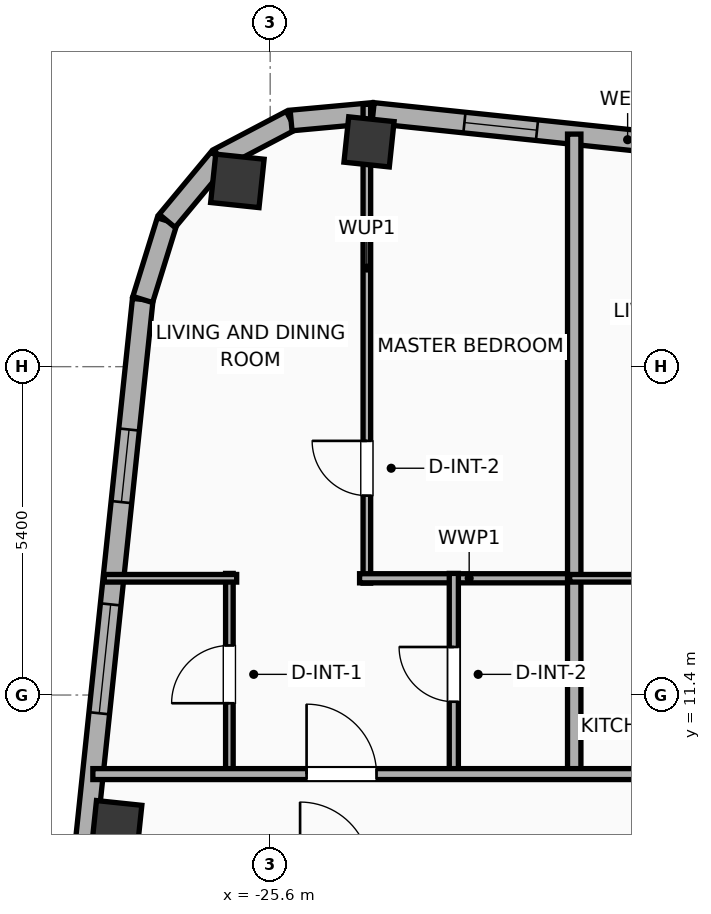
"""IFC4 building model, lengths in metres.
Left out: names, types, materials, properties, quantities, classifications, styles, units other than length and angle.
Written with IfcOpenShell. Run it as: python <this file> out.ifc"""

import sys

from ifc_helpers import new_model, si_unit, direction, frame, frame_2d, origin, origin_2d, place, context, subcontext, project, spatial, rectangle, hollow_rectangle, hollow_circle, extrude, element, fill, save


model = new_model("IFC4")
c1 = context("Model", 3, precision=1e-05, world=origin(), true_north=direction((0.0, 1.0)))
c2 = subcontext(c1, "Body", "Model", "MODEL_VIEW")
j1 = project(units=[si_unit("LENGTHUNIT", "METRE"), si_unit("PLANEANGLEUNIT", "RADIAN")], contexts=[c1])
p1 = place(None, origin())
s1 = spatial("IfcSite", under=j1, at=p1, CompositionType="ELEMENT")
p2 = place(p1, origin())
s2 = spatial("IfcBuilding", under=s1, at=p2, CompositionType="ELEMENT")
p3 = place(p2, frame((0.0, 0.0, 260.0)))
s3 = spatial("IfcBuildingStorey", under=s2, at=p3, CompositionType="ELEMENT", Elevation=260.0)
p4 = place(p3, frame((-23.975, 20.497, 0.0), z_axis=(0.0, 0.0, 1.0), x_axis=(0.994521895368, -0.104528463268, 0.0)))
e1 = element("IfcColumn", 1, at=p4, inside=s3, PredefinedType="COLUMN", context=c2, shape_type="SweptSolid", body=[
    extrude(hollow_rectangle(XDim=0.75, YDim=0.75, WallThickness=0.025, at=origin_2d()), origin(), (0.0, 0.0, 1.0), 3.9),
])
p5 = place(p3, frame((-26.139, 19.855, 0.0), z_axis=(0.0, 0.0, 1.0), x_axis=(0.994521895368, -0.104528463268, 0.0)))
e2 = element("IfcColumn", 2, at=p5, inside=s3, PredefinedType="COLUMN", context=c2, shape_type="SweptSolid", body=[
    extrude(hollow_circle(Radius=0.4, WallThickness=0.028, at=origin_2d()), origin(), (0.0, 0.0, 1.0), 3.9),
])
p6 = place(p3, frame((-28.123, 9.252, 0.0), z_axis=(0.0, 0.0, 1.0), x_axis=(0.994521895368, -0.104528463268, 0.0)))
e3 = element("IfcColumn", 3, at=p6, inside=s3, PredefinedType="COLUMN", context=c2, shape_type="SweptSolid", body=[
    extrude(hollow_rectangle(XDim=0.75, YDim=0.75, WallThickness=0.025, at=origin_2d()), origin(), (0.0, 0.0, 1.0), 3.9),
])
p7 = place(p3, frame((-30.87, -12.296, 0.0), z_axis=(0.0, 0.0, 1.0), x_axis=(0.104533282919, 0.994521388791, 0.0)))
e4 = element("IfcWall", 4, at=p7, inside=s3, PredefinedType="ELEMENTEDWALL", context=c2, shape_type="SweptSolid", body=[
    extrude(rectangle(XDim=30.366, YDim=0.34, at=frame_2d((15.183, 0.0))), origin(), (0.0, 0.0, 1.0), 2.54),
])
p8 = place(p7, frame((5.842, 0.0, 0.75)))
e5 = element("IfcOpeningElement", 5, at=p8, cuts=e4, PredefinedType="OPENING", context=c2, shape_type="SweptSolid", body=[
    extrude(rectangle(XDim=1.8, YDim=1.63, at=frame_2d((0.9, 0.815))), frame((0.0, 0.18, 0.0), z_axis=(0.0, -1.0, 0.0), x_axis=(1.0, 0.0, 0.0)), (0.0, 0.0, 1.0), 0.36),
])
p9 = place(p7, frame((23.525, 0.0, 0.75)))
e6 = element("IfcOpeningElement", 6, at=p9, cuts=e4, PredefinedType="OPENING", context=c2, shape_type="SweptSolid", body=[
    extrude(rectangle(XDim=1.8, YDim=1.63, at=frame_2d((0.9, 0.815))), frame((0.0, 0.18, 0.0), z_axis=(0.0, -1.0, 0.0), x_axis=(1.0, 0.0, 0.0)), (0.0, 0.0, 1.0), 0.36),
])
p10 = place(p7, frame((27.017, 0.0, 0.75)))
e7 = element("IfcOpeningElement", 7, at=p10, cuts=e4, PredefinedType="OPENING", context=c2, shape_type="SweptSolid", body=[
    extrude(rectangle(XDim=1.2, YDim=1.63, at=frame_2d((0.6, 0.815))), frame((0.0, 0.18, 0.0), z_axis=(0.0, -1.0, 0.0), x_axis=(1.0, 0.0, 0.0)), (0.0, 0.0, 1.0), 0.36),
])
p11 = place(p7, frame((16.135, 0.0, 0.75)))
e8 = element("IfcOpeningElement", 8, at=p11, cuts=e4, PredefinedType="OPENING", context=c2, shape_type="SweptSolid", body=[
    extrude(rectangle(XDim=1.2, YDim=1.63, at=frame_2d((0.6, 0.815))), frame((0.0, 0.18, 0.0), z_axis=(0.0, -1.0, 0.0), x_axis=(1.0, 0.0, 0.0)), (0.0, 0.0, 1.0), 0.36),
])
p12 = place(p3, frame((-27.696, 17.905, 0.0), z_axis=(0.0, 0.0, 1.0), x_axis=(0.296416228123, 0.955058856671, 0.0)))
e9 = element("IfcWall", 9, at=p12, inside=s3, PredefinedType="ELEMENTEDWALL", context=c2, shape_type="SweptSolid", body=[
    extrude(rectangle(XDim=1.354, YDim=0.34, at=frame_2d((0.677, 0.0))), origin(), (0.0, 0.0, 1.0), 3.65),
])
p13 = place(p3, frame((-27.294, 19.198, 0.0), z_axis=(0.0, 0.0, 1.0), x_axis=(0.639501603217, 0.768789762863, 0.0)))
e10 = element("IfcWall", 10, at=p13, inside=s3, PredefinedType="ELEMENTEDWALL", context=c2, shape_type="SweptSolid", body=[
    extrude(rectangle(XDim=1.337, YDim=0.34, at=frame_2d((0.668, 0.0))), origin(), (0.0, 0.0, 1.0), 3.65),
])
p14 = place(p3, frame((-26.439, 20.226, 0.0), z_axis=(0.0, 0.0, 1.0), x_axis=(0.884922182678, 0.465738908193, 0.0)))
e11 = element("IfcWall", 11, at=p14, inside=s3, PredefinedType="ELEMENTEDWALL", context=c2, shape_type="SweptSolid", body=[
    extrude(rectangle(XDim=1.337, YDim=0.34, at=frame_2d((0.668, 0.0))), origin(), (0.0, 0.0, 1.0), 2.54),
])
p15 = place(p3, frame((-25.256, 20.848, 0.0), z_axis=(0.0, 0.0, 1.0), x_axis=(0.995813013343, 0.091413579172, 0.0)))
e12 = element("IfcWall", 12, at=p15, inside=s3, PredefinedType="ELEMENTEDWALL", context=c2, shape_type="SweptSolid", body=[
    extrude(rectangle(XDim=1.354, YDim=0.34, at=frame_2d((0.677, 0.0))), origin(), (0.0, 0.0, 1.0), 2.54),
])
p16 = place(p3, frame((-23.908, 20.972, 0.0), z_axis=(0.0, 0.0, 1.0), x_axis=(0.994522285292, -0.104524753323, 0.0)))
e13 = element("IfcWall", 13, at=p16, inside=s3, PredefinedType="ELEMENTEDWALL", context=c2, shape_type="SweptSolid", body=[
    extrude(rectangle(XDim=8.418, YDim=0.34, at=frame_2d((4.209, 0.0))), origin(), (0.0, 0.0, 1.0), 2.54),
])
p17 = place(p16, frame((1.51, 0.0, 0.75)))
e14 = element("IfcOpeningElement", 14, at=p17, cuts=e13, PredefinedType="OPENING", context=c2, shape_type="SweptSolid", body=[
    extrude(rectangle(XDim=1.2, YDim=1.63, at=frame_2d((0.6, 0.815))), frame((0.0, 0.18, 0.0), z_axis=(0.0, -1.0, 0.0), x_axis=(1.0, 0.0, 0.0)), (0.0, 0.0, 1.0), 0.36),
])
p18 = place(p16, frame((4.827, 0.0, 0.75)))
e15 = element("IfcOpeningElement", 15, at=p18, cuts=e13, PredefinedType="OPENING", context=c2, shape_type="SweptSolid", body=[
    extrude(rectangle(XDim=1.2, YDim=1.63, at=frame_2d((0.6, 0.815))), frame((0.0, 0.18, 0.0), z_axis=(0.0, -1.0, 0.0), x_axis=(1.0, 0.0, 0.0)), (0.0, 0.0, 1.0), 0.36),
])
p19 = place(p3, frame((-24.01, 13.24, 0.0), z_axis=(0.0, 0.0, 1.0), x_axis=(0.0, 1.0, 0.0)))
e16 = element("IfcWall", 16, at=p19, inside=s3, PredefinedType="PARTITIONING", context=c2, shape_type="SweptSolid", body=[
    extrude(rectangle(XDim=7.873, YDim=0.125, at=frame_2d((3.937, 0.0))), origin(), (0.0, 0.0, 1.0), 2.54),
])
p20 = place(p19, frame((1.44, 0.0, 0.0)))
e17 = element("IfcOpeningElement", 17, at=p20, cuts=e16, PredefinedType="OPENING", context=c2, shape_type="SweptSolid", body=[
    extrude(rectangle(XDim=0.9, YDim=2.05, at=frame_2d((0.45, 1.025))), frame((0.0, 0.073, 0.0), z_axis=(0.0, -1.0, 0.0), x_axis=(1.0, 0.0, 0.0)), (0.0, 0.0, 1.0), 0.145),
])
p21 = place(p3, frame((-24.13, 13.32, 0.0), z_axis=(0.0, 0.0, 1.0), x_axis=(1.0, 0.0, 0.0)))
e18 = element("IfcWall", 18, at=p21, inside=s3, PredefinedType="PLUMBINGWALL", context=c2, shape_type="SweptSolid", body=[
    extrude(rectangle(XDim=3.605, YDim=0.15, at=frame_2d((1.802, 0.0))), origin(), (0.0, 0.0, 1.0), 3.65),
])
p22 = place(p3, frame((-26.271, 10.08, 0.0), z_axis=(0.0, 0.0, 1.0), x_axis=(0.0, 1.0, 0.0)))
e19 = element("IfcWall", 19, at=p22, inside=s3, PredefinedType="PARTITIONING", context=c2, shape_type="SweptSolid", body=[
    extrude(rectangle(XDim=3.32, YDim=0.125, at=frame_2d((1.66, 0.0))), origin(), (0.0, 0.0, 1.0), 3.65),
])
p23 = place(p22, frame((1.185, 0.0, 0.0)))
e20 = element("IfcOpeningElement", 20, at=p23, cuts=e19, PredefinedType="OPENING", context=c2, shape_type="SweptSolid", body=[
    extrude(rectangle(XDim=0.95, YDim=2.05, at=frame_2d((0.475, 1.025))), frame((0.0, 0.073, 0.0), z_axis=(0.0, -1.0, 0.0), x_axis=(1.0, 0.0, 0.0)), (0.0, 0.0, 1.0), 0.145),
])
p24 = place(p3, frame((-28.329, 13.32, 0.0), z_axis=(0.0, 0.0, 1.0), x_axis=(1.0, 0.0, 0.0)))
e21 = element("IfcWall", 21, at=p24, inside=s3, PredefinedType="PARTITIONING", context=c2, shape_type="SweptSolid", body=[
    extrude(rectangle(XDim=2.178, YDim=0.125, at=frame_2d((1.089, 0.0))), origin(), (0.0, 0.0, 1.0), 3.65),
])
p25 = place(p3, frame((-22.58, 10.08, 0.0), z_axis=(0.0, 0.0, 1.0), x_axis=(0.0, 1.0, 0.0)))
e22 = element("IfcWall", 22, at=p25, inside=s3, PredefinedType="PLUMBINGWALL", context=c2, shape_type="SweptSolid", body=[
    extrude(rectangle(XDim=3.32, YDim=0.15, at=frame_2d((1.66, 0.0))), origin(), (0.0, 0.0, 1.0), 3.65),
])
p26 = place(p25, frame((1.21, 0.0, 0.0)))
e23 = element("IfcOpeningElement", 23, at=p26, cuts=e22, PredefinedType="OPENING", context=c2, shape_type="SweptSolid", body=[
    extrude(rectangle(XDim=0.9, YDim=2.05, at=frame_2d((0.45, 1.025))), frame((0.0, 0.085, 0.0), z_axis=(0.0, -1.0, 0.0), x_axis=(1.0, 0.0, 0.0)), (0.0, 0.0, 1.0), 0.17),
])
p27 = place(p3, frame((-20.6, 10.02, 0.0), z_axis=(0.0, 0.0, 1.0), x_axis=(0.0, 1.0, 0.0)))
e24 = element("IfcWall", 24, at=p27, inside=s3, PredefinedType="PARTITIONING", context=c2, shape_type="SweptSolid", body=[
    extrude(rectangle(XDim=10.604, YDim=0.22, at=frame_2d((5.302, 0.0))), origin(), (0.0, 0.0, 1.0), 2.54),
])
p28 = place(p3, frame((-20.675, 13.32, 0.0), z_axis=(0.0, 0.0, 1.0), x_axis=(1.0, 0.0, 0.0)))
e25 = element("IfcWall", 25, at=p28, inside=s3, PredefinedType="PARTITIONING", context=c2, shape_type="SweptSolid", body=[
    extrude(rectangle(XDim=2.505, YDim=0.125, at=frame_2d((1.252, 0.0))), origin(), (0.0, 0.0, 1.0), 3.65),
])
p29 = place(p3, frame((-28.516, 10.1, 0.0), z_axis=(0.0, 0.0, 1.0), x_axis=(1.0, 0.0, 0.0)))
e26 = element("IfcWall", 26, at=p29, inside=s3, PredefinedType="PARTITIONING", context=c2, shape_type="SweptSolid", body=[
    extrude(rectangle(XDim=53.955, YDim=0.18, at=frame_2d((26.978, 0.0))), origin(), (0.0, 0.0, 1.0), 3.65),
])
p30 = place(p29, frame((3.515, 0.0, 0.0)))
e27 = element("IfcOpeningElement", 27, at=p30, cuts=e26, PredefinedType="OPENING", context=c2, shape_type="SweptSolid", body=[
    extrude(rectangle(XDim=1.15, YDim=2.05, at=frame_2d((0.575, 1.025))), frame((0.0, 0.1, 0.0), z_axis=(0.0, -1.0, 0.0), x_axis=(1.0, 0.0, 0.0)), (0.0, 0.0, 1.0), 0.2),
])
p31 = place(p29, frame((11.408, 0.0, 0.0)))
e28 = element("IfcOpeningElement", 28, at=p31, cuts=e26, PredefinedType="OPENING", context=c2, shape_type="SweptSolid", body=[
    extrude(rectangle(XDim=1.15, YDim=2.05, at=frame_2d((0.575, 1.025))), frame((0.0, 0.1, 0.0), z_axis=(0.0, -1.0, 0.0), x_axis=(1.0, 0.0, 0.0)), (0.0, 0.0, 1.0), 0.2),
])
p32 = place(p29, frame((19.205, 0.0, 0.0)))
e29 = element("IfcOpeningElement", 29, at=p32, cuts=e26, PredefinedType="OPENING", context=c2, shape_type="SweptSolid", body=[
    extrude(rectangle(XDim=1.15, YDim=2.05, at=frame_2d((0.575, 1.025))), frame((0.0, 0.1, 0.0), z_axis=(0.0, -1.0, 0.0), x_axis=(1.0, 0.0, 0.0)), (0.0, 0.0, 1.0), 0.2),
])
p33 = place(p29, frame((27.159, 0.0, 0.0)))
e30 = element("IfcOpeningElement", 30, at=p33, cuts=e26, PredefinedType="OPENING", context=c2, shape_type="SweptSolid", body=[
    extrude(rectangle(XDim=0.9, YDim=2.05, at=frame_2d((0.45, 1.025))), frame((0.0, 0.1, 0.0), z_axis=(0.0, -1.0, 0.0), x_axis=(1.0, 0.0, 0.0)), (0.0, 0.0, 1.0), 0.2),
])
p34 = place(p29, frame((34.642, 0.0, 0.0)))
e31 = element("IfcOpeningElement", 31, at=p34, cuts=e26, PredefinedType="OPENING", context=c2, shape_type="SweptSolid", body=[
    extrude(rectangle(XDim=1.15, YDim=2.05, at=frame_2d((0.575, 1.025))), frame((0.0, 0.1, 0.0), z_axis=(0.0, -1.0, 0.0), x_axis=(1.0, 0.0, 0.0)), (0.0, 0.0, 1.0), 0.2),
])
p35 = place(p29, frame((42.606, 0.0, 0.0)))
e32 = element("IfcOpeningElement", 32, at=p35, cuts=e26, PredefinedType="OPENING", context=c2, shape_type="SweptSolid", body=[
    extrude(rectangle(XDim=1.15, YDim=2.05, at=frame_2d((0.575, 1.025))), frame((0.0, 0.1, 0.0), z_axis=(0.0, -1.0, 0.0), x_axis=(1.0, 0.0, 0.0)), (0.0, 0.0, 1.0), 0.2),
])
p36 = place(p29, frame((50.279, 0.0, 0.0)))
e33 = element("IfcOpeningElement", 33, at=p36, cuts=e26, PredefinedType="OPENING", context=c2, shape_type="SweptSolid", body=[
    extrude(rectangle(XDim=0.9, YDim=2.05, at=frame_2d((0.45, 1.025))), frame((0.0, 0.1, 0.0), z_axis=(0.0, -1.0, 0.0), x_axis=(1.0, 0.0, 0.0)), (0.0, 0.0, 1.0), 0.2),
])
p37 = place(p9, origin())
e34 = element("IfcWindow", 34, at=p37, inside=s3, PartitioningType="SINGLE_PANEL", PredefinedType="WINDOW", context=c2, shape_type="SweptSolid", body=[
    extrude(rectangle(XDim=1.8, YDim=1.63, at=frame_2d((0.9, 0.815))), frame((0.0, 0.03, 0.0), z_axis=(0.0, -1.0, 0.0), x_axis=(1.0, 0.0, 0.0)), (0.0, 0.0, 1.0), 0.06),
])
fill(e6, e34)
p38 = place(p10, origin())
e35 = element("IfcWindow", 35, at=p38, inside=s3, PartitioningType="SINGLE_PANEL", PredefinedType="WINDOW", context=c2, shape_type="SweptSolid", body=[
    extrude(rectangle(XDim=1.2, YDim=1.63, at=frame_2d((0.6, 0.815))), frame((0.0, 0.03, 0.0), z_axis=(0.0, -1.0, 0.0), x_axis=(1.0, 0.0, 0.0)), (0.0, 0.0, 1.0), 0.06),
])
fill(e7, e35)
p39 = place(p17, origin())
e36 = element("IfcWindow", 36, at=p39, inside=s3, PartitioningType="SINGLE_PANEL", PredefinedType="WINDOW", context=c2, shape_type="SweptSolid", body=[
    extrude(rectangle(XDim=1.2, YDim=1.63, at=frame_2d((0.6, 0.815))), frame((0.0, 0.03, 0.0), z_axis=(0.0, -1.0, 0.0), x_axis=(1.0, 0.0, 0.0)), (0.0, 0.0, 1.0), 0.06),
])
fill(e14, e36)
p40 = place(p20, origin())
e37 = element("IfcDoor", 37, at=p40, inside=s3, OperationType="SINGLE_SWING_RIGHT", PredefinedType="DOOR", context=c2, shape_type="SweptSolid", body=[
    extrude(rectangle(XDim=0.9, YDim=2.05, at=frame_2d((0.45, 1.025))), frame((0.0, 0.025, 0.0), z_axis=(0.0, -1.0, 0.0), x_axis=(1.0, 0.0, 0.0)), (0.0, 0.0, 1.0), 0.05),
])
fill(e17, e37)
p41 = place(p23, origin())
e38 = element("IfcDoor", 38, at=p41, inside=s3, OperationType="SINGLE_SWING_LEFT", PredefinedType="DOOR", context=c2, shape_type="SweptSolid", body=[
    extrude(rectangle(XDim=0.95, YDim=2.05, at=frame_2d((0.475, 1.025))), frame((0.0, 0.025, 0.0), z_axis=(0.0, -1.0, 0.0), x_axis=(1.0, 0.0, 0.0)), (0.0, 0.0, 1.0), 0.05),
])
fill(e20, e38)
p42 = place(p26, origin())
e39 = element("IfcDoor", 39, at=p42, inside=s3, OperationType="SINGLE_SWING_RIGHT", PredefinedType="DOOR", context=c2, shape_type="SweptSolid", body=[
    extrude(rectangle(XDim=0.9, YDim=2.05, at=frame_2d((0.45, 1.025))), frame((0.0, 0.025, 0.0), z_axis=(0.0, -1.0, 0.0), x_axis=(1.0, 0.0, 0.0)), (0.0, 0.0, 1.0), 0.05),
])
fill(e23, e39)
p43 = place(p30, origin())
e40 = element("IfcDoor", 40, at=p43, inside=s3, OperationType="SINGLE_SWING_LEFT", PredefinedType="DOOR", context=c2, shape_type="SweptSolid", body=[
    extrude(rectangle(XDim=1.15, YDim=2.05, at=frame_2d((0.575, 1.025))), frame((0.0, 0.025, 0.0), z_axis=(0.0, -1.0, 0.0), x_axis=(1.0, 0.0, 0.0)), (0.0, 0.0, 1.0), 0.05),
])
fill(e27, e40)
save(model, sys.argv[1])
